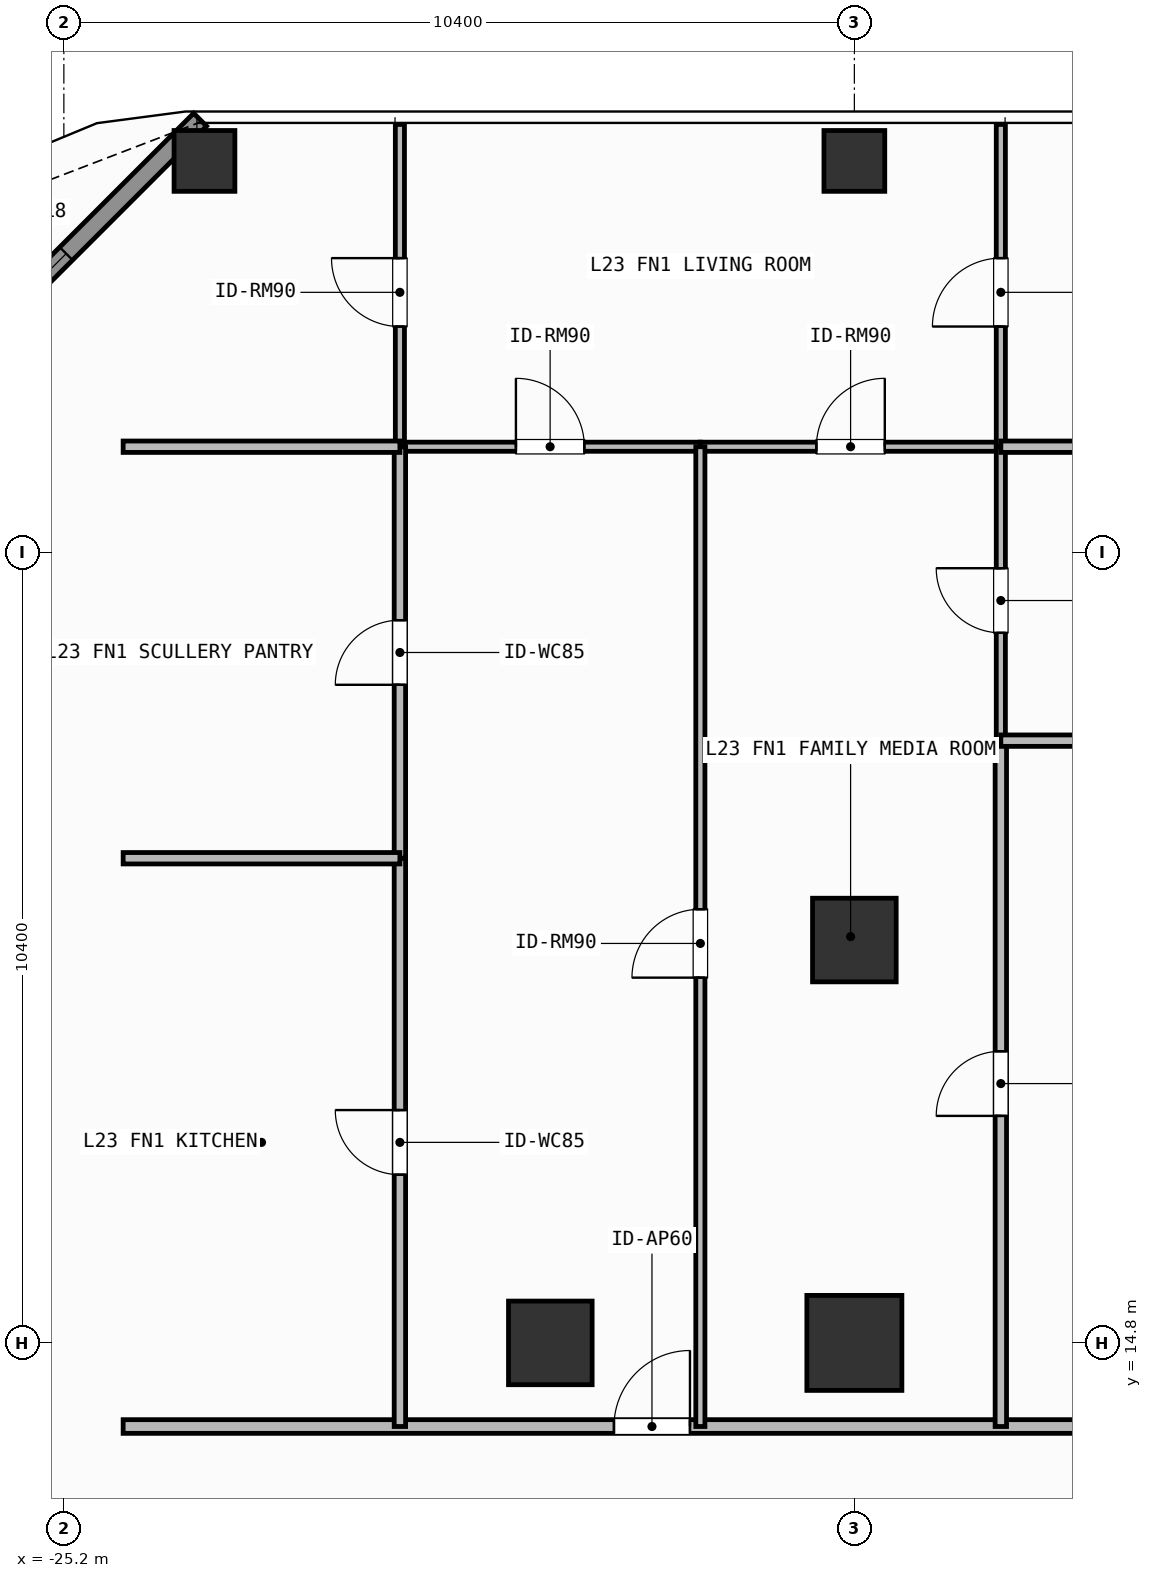
"""IFC4 building model, lengths in metres.
Left out: names, types, materials, properties, quantities, classifications, styles, units other than length and angle.
Written with IfcOpenShell. Run it as: python <this file> out.ifc"""

import sys

from ifc_helpers import new_model, si_unit, direction, frame, frame_2d, origin, origin_2d, place, context, subcontext, project, spatial, rectangle, hollow_rectangle, extrude, element, fill, save


model = new_model("IFC4")
c1 = context("Model", 3, precision=1e-05, world=origin(), true_north=direction((0.0, 1.0)))
c2 = subcontext(c1, "Body", "Model", "MODEL_VIEW")
j1 = project(units=[si_unit("LENGTHUNIT", "METRE"), si_unit("PLANEANGLEUNIT", "RADIAN")], contexts=[c1])
p1 = place(None, origin())
s1 = spatial("IfcSite", under=j1, at=p1, CompositionType="ELEMENT")
p2 = place(p1, origin())
s2 = spatial("IfcBuilding", under=s1, at=p2, CompositionType="ELEMENT")
p3 = place(p2, frame((0.0, 0.0, 93.0)))
s3 = spatial("IfcBuildingStorey", under=s2, at=p3, CompositionType="ELEMENT", Elevation=93.0)
p4 = place(p3, frame((-14.8, 14.8, 0.0), z_axis=(0.0, 0.0, 1.0), x_axis=(1.0, 0.0, 0.0)))
e1 = element("IfcColumn", 1, at=p4, inside=s3, PredefinedType="COLUMN", context=c2, shape_type="SweptSolid", body=[
    extrude(rectangle(XDim=1.25, YDim=1.25, at=origin_2d()), origin(), (0.0, 0.0, 1.0), 3.9),
])
for number, where, z_axis, x_axis in (
    (2, (-18.8, 14.8, 0.0), (0.0, 0.0, 1.0), (1.0, 0.0, 0.0)),
    (3, (-14.8, 20.1, 0.0), (0.0, 0.0, 1.0), (1.0, 0.0, 0.0)),
):
    element("IfcColumn", number, at=place(p3, frame(where, z_axis=z_axis, x_axis=x_axis)), inside=s3, PredefinedType="COLUMN", context=c2, shape_type="SweptSolid", body=[
        extrude(rectangle(XDim=1.1, YDim=1.1, at=origin_2d()), origin(), (0.0, 0.0, 1.0), 3.9),
    ])
for number, where, z_axis, x_axis in (
    (4, (-23.35, 30.35, 0.0), (0.0, 0.0, 1.0), (1.0, 0.0, 0.0)),
    (5, (-14.8, 30.35, 0.0), (0.0, 0.0, 1.0), (1.0, 0.0, 0.0)),
):
    element("IfcColumn", number, at=place(p3, frame(where, z_axis=z_axis, x_axis=x_axis)), inside=s3, PredefinedType="COLUMN", context=c2, shape_type="SweptSolid", body=[
        extrude(hollow_rectangle(XDim=0.8, YDim=0.8, WallThickness=0.036, at=origin_2d()), origin(), (0.0, 0.0, 1.0), 3.9),
    ])
p5 = place(p3, frame((-27.992, 26.308, 0.0), z_axis=(0.0, 0.0, 1.0), x_axis=(0.707106781187, 0.707106781187, 0.0)))
e6 = element("IfcWall", 6, at=p5, inside=s3, PredefinedType="SOLIDWALL", context=c2, shape_type="SweptSolid", body=[
    extrude(rectangle(XDim=6.484, YDim=0.24, at=frame_2d((3.242, 0.0))), origin(), (0.0, 0.0, 1.0), 3.68),
])
p6 = place(p5, frame((2.492, 0.0, 0.8)))
e7 = element("IfcOpeningElement", 7, at=p6, cuts=e6, PredefinedType="OPENING", context=c2, shape_type="SweptSolid", body=[
    extrude(rectangle(XDim=1.5, YDim=1.85, at=frame_2d((0.75, 0.925))), frame((0.0, 0.13, 0.0), z_axis=(0.0, -1.0, 0.0), x_axis=(1.0, 0.0, 0.0)), (0.0, 0.0, 1.0), 0.26),
])
p7 = place(p3, frame((-24.42, 13.7, 0.0), z_axis=(0.0, 0.0, 1.0), x_axis=(1.0, 0.0, 0.0)))
e8 = element("IfcWall", 8, at=p7, inside=s3, PredefinedType="PARTITIONING", context=c2, shape_type="SweptSolid", body=[
    extrude(rectangle(XDim=14.634, YDim=0.18, at=frame_2d((7.317, 0.0))), origin(), (0.0, 0.0, 1.0), 3.68),
])
p8 = place(p7, frame((6.457, 0.0, 0.0)))
e9 = element("IfcOpeningElement", 9, at=p8, cuts=e8, PredefinedType="OPENING", context=c2, shape_type="SweptSolid", body=[
    extrude(rectangle(XDim=1.0, YDim=2.2, at=frame_2d((0.5, 1.1))), frame((0.0, 0.1, 0.0), z_axis=(0.0, -1.0, 0.0), x_axis=(1.0, 0.0, 0.0)), (0.0, 0.0, 1.0), 0.2),
])
p9 = place(p3, frame((-20.779, 26.59, 0.0), z_axis=(0.0, 0.0, 1.0), x_axis=(1.0, 0.0, 0.0)))
e10 = element("IfcWall", 10, at=p9, inside=s3, PredefinedType="PARTITIONING", context=c2, shape_type="SweptSolid", body=[
    extrude(rectangle(XDim=3.953, YDim=0.12, at=frame_2d((1.977, 0.0))), origin(), (0.0, 0.0, 1.0), 3.68),
])
p10 = place(p9, frame((1.527, 0.0, 0.0)))
e11 = element("IfcOpeningElement", 11, at=p10, cuts=e10, PredefinedType="OPENING", context=c2, shape_type="SweptSolid", body=[
    extrude(rectangle(XDim=0.9, YDim=2.1, at=frame_2d((0.45, 1.05))), frame((0.0, 0.07, 0.0), z_axis=(0.0, -1.0, 0.0), x_axis=(1.0, 0.0, 0.0)), (0.0, 0.0, 1.0), 0.14),
])
p11 = place(p3, frame((-16.826, 26.59, 0.0), z_axis=(0.0, 0.0, 1.0), x_axis=(1.0, 0.0, 0.0)))
e12 = element("IfcWall", 12, at=p11, inside=s3, PredefinedType="PARTITIONING", context=c2, shape_type="SweptSolid", body=[
    extrude(rectangle(XDim=3.953, YDim=0.12, at=frame_2d((1.977, 0.0))), origin(), (0.0, 0.0, 1.0), 3.68),
])
p12 = place(p11, frame((1.527, 0.0, 0.0)))
e13 = element("IfcOpeningElement", 13, at=p12, cuts=e12, PredefinedType="OPENING", context=c2, shape_type="SweptSolid", body=[
    extrude(rectangle(XDim=0.9, YDim=2.1, at=frame_2d((0.45, 1.05))), frame((0.0, 0.07, 0.0), z_axis=(0.0, -1.0, 0.0), x_axis=(1.0, 0.0, 0.0)), (0.0, 0.0, 1.0), 0.14),
])
p13 = place(p3, frame((-16.826, 13.7, 0.0), z_axis=(0.0, 0.0, 1.0), x_axis=(0.0, 1.0, 0.0)))
e14 = element("IfcWall", 14, at=p13, inside=s3, PredefinedType="PARTITIONING", context=c2, shape_type="SweptSolid", body=[
    extrude(rectangle(XDim=12.89, YDim=0.12, at=frame_2d((6.445, 0.0))), origin(), (0.0, 0.0, 1.0), 3.68),
])
p14 = place(p13, frame((5.905, 0.0, 0.0)))
e15 = element("IfcOpeningElement", 15, at=p14, cuts=e14, PredefinedType="OPENING", context=c2, shape_type="SweptSolid", body=[
    extrude(rectangle(XDim=0.9, YDim=2.1, at=frame_2d((0.45, 1.05))), frame((0.0, 0.07, 0.0), z_axis=(0.0, -1.0, 0.0), x_axis=(1.0, 0.0, 0.0)), (0.0, 0.0, 1.0), 0.14),
])
p15 = place(p3, frame((-20.779, 13.7, 0.0), z_axis=(0.0, 0.0, 1.0), x_axis=(0.0, 1.0, 0.0)))
e16 = element("IfcWall", 16, at=p15, inside=s3, PredefinedType="PARTITIONING", context=c2, shape_type="SweptSolid", body=[
    extrude(rectangle(XDim=7.476, YDim=0.15, at=frame_2d((3.738, 0.0))), origin(), (0.0, 0.0, 1.0), 3.68),
])
p16 = place(p15, frame((3.313, 0.0, 0.0)))
e17 = element("IfcOpeningElement", 17, at=p16, cuts=e16, PredefinedType="OPENING", context=c2, shape_type="SweptSolid", body=[
    extrude(rectangle(XDim=0.85, YDim=2.1, at=frame_2d((0.425, 1.05))), frame((0.0, 0.085, 0.0), z_axis=(0.0, -1.0, 0.0), x_axis=(1.0, 0.0, 0.0)), (0.0, 0.0, 1.0), 0.17),
])
p17 = place(p3, frame((-20.779, 21.176, 0.0), z_axis=(0.0, 0.0, 1.0), x_axis=(0.0, 1.0, 0.0)))
e18 = element("IfcWall", 18, at=p17, inside=s3, PredefinedType="PARTITIONING", context=c2, shape_type="SweptSolid", body=[
    extrude(rectangle(XDim=5.414, YDim=0.15, at=frame_2d((2.707, 0.0))), origin(), (0.0, 0.0, 1.0), 3.68),
])
p18 = place(p17, frame((2.282, 0.0, 0.0)))
e19 = element("IfcOpeningElement", 19, at=p18, cuts=e18, PredefinedType="OPENING", context=c2, shape_type="SweptSolid", body=[
    extrude(rectangle(XDim=0.85, YDim=2.1, at=frame_2d((0.425, 1.05))), frame((0.0, 0.085, 0.0), z_axis=(0.0, -1.0, 0.0), x_axis=(1.0, 0.0, 0.0)), (0.0, 0.0, 1.0), 0.17),
])
p19 = place(p3, frame((-20.779, 26.59, 0.0), z_axis=(0.0, 0.0, 1.0), x_axis=(0.0, 1.0, 0.0)))
e20 = element("IfcWall", 20, at=p19, inside=s3, PredefinedType="PARTITIONING", context=c2, shape_type="SweptSolid", body=[
    extrude(rectangle(XDim=4.24, YDim=0.12, at=frame_2d((2.12, 0.0))), origin(), (0.0, 0.0, 1.0), 3.68),
])
p20 = place(p19, frame((1.581, 0.0, 0.0)))
e21 = element("IfcOpeningElement", 21, at=p20, cuts=e20, PredefinedType="OPENING", context=c2, shape_type="SweptSolid", body=[
    extrude(rectangle(XDim=0.9, YDim=2.1, at=frame_2d((0.45, 1.05))), frame((0.0, 0.07, 0.0), z_axis=(0.0, -1.0, 0.0), x_axis=(1.0, 0.0, 0.0)), (0.0, 0.0, 1.0), 0.14),
])
p21 = place(p3, frame((-12.873, 13.7, 0.0), z_axis=(0.0, 0.0, 1.0), x_axis=(0.0, 1.0, 0.0)))
e22 = element("IfcWall", 22, at=p21, inside=s3, PredefinedType="PARTITIONING", context=c2, shape_type="SweptSolid", body=[
    extrude(rectangle(XDim=9.023, YDim=0.15, at=frame_2d((4.511, 0.0))), origin(), (0.0, 0.0, 1.0), 3.68),
])
p22 = place(p21, frame((4.086, 0.0, 0.0)))
e23 = element("IfcOpeningElement", 23, at=p22, cuts=e22, PredefinedType="OPENING", context=c2, shape_type="SweptSolid", body=[
    extrude(rectangle(XDim=0.85, YDim=2.1, at=frame_2d((0.425, 1.05))), frame((0.0, 0.085, 0.0), z_axis=(0.0, -1.0, 0.0), x_axis=(1.0, 0.0, 0.0)), (0.0, 0.0, 1.0), 0.17),
])
p23 = place(p3, frame((-12.873, 22.723, 0.0), z_axis=(0.0, 0.0, 1.0), x_axis=(0.0, 1.0, 0.0)))
e24 = element("IfcWall", 24, at=p23, inside=s3, PredefinedType="PARTITIONING", context=c2, shape_type="SweptSolid", body=[
    extrude(rectangle(XDim=3.867, YDim=0.12, at=frame_2d((1.934, 0.0))), origin(), (0.0, 0.0, 1.0), 3.68),
])
p24 = place(p23, frame((1.419, 0.0, 0.0)))
e25 = element("IfcOpeningElement", 25, at=p24, cuts=e24, PredefinedType="OPENING", context=c2, shape_type="SweptSolid", body=[
    extrude(rectangle(XDim=0.85, YDim=2.1, at=frame_2d((0.425, 1.05))), frame((0.0, 0.07, 0.0), z_axis=(0.0, -1.0, 0.0), x_axis=(1.0, 0.0, 0.0)), (0.0, 0.0, 1.0), 0.14),
])
p25 = place(p3, frame((-12.873, 26.59, 0.0), z_axis=(0.0, 0.0, 1.0), x_axis=(0.0, 1.0, 0.0)))
e26 = element("IfcWall", 26, at=p25, inside=s3, PredefinedType="PARTITIONING", context=c2, shape_type="SweptSolid", body=[
    extrude(rectangle(XDim=4.24, YDim=0.12, at=frame_2d((2.12, 0.0))), origin(), (0.0, 0.0, 1.0), 3.68),
])
p26 = place(p25, frame((1.581, 0.0, 0.0)))
e27 = element("IfcOpeningElement", 27, at=p26, cuts=e26, PredefinedType="OPENING", context=c2, shape_type="SweptSolid", body=[
    extrude(rectangle(XDim=0.9, YDim=2.1, at=frame_2d((0.45, 1.05))), frame((0.0, 0.07, 0.0), z_axis=(0.0, -1.0, 0.0), x_axis=(1.0, 0.0, 0.0)), (0.0, 0.0, 1.0), 0.14),
])
for number, where, z_axis, x_axis in (
    (28, (-24.42, 21.176, 0.0), (0.0, 0.0, 1.0), (1.0, 0.0, 0.0)),
    (29, (-24.42, 26.59, 0.0), (0.0, 0.0, 1.0), (1.0, 0.0, 0.0)),
):
    element("IfcWall", number, at=place(p3, frame(where, z_axis=z_axis, x_axis=x_axis)), inside=s3, PredefinedType="PARTITIONING", context=c2, shape_type="SweptSolid", body=[
        extrude(rectangle(XDim=3.641, YDim=0.15, at=frame_2d((1.82, 0.0))), origin(), (0.0, 0.0, 1.0), 3.68),
    ])
for number, where, z_axis, x_axis in (
    (30, (-12.873, 22.723, 0.0), (0.0, 0.0, 1.0), (1.0, 0.0, 0.0)),
    (31, (-12.873, 26.59, 0.0), (0.0, 0.0, 1.0), (1.0, 0.0, 0.0)),
):
    element("IfcWall", number, at=place(p3, frame(where, z_axis=z_axis, x_axis=x_axis)), inside=s3, PredefinedType="PARTITIONING", context=c2, shape_type="SweptSolid", body=[
        extrude(rectangle(XDim=3.087, YDim=0.15, at=frame_2d((1.543, 0.0))), origin(), (0.0, 0.0, 1.0), 3.68),
    ])
p27 = place(p6, origin())
e32 = element("IfcWindow", 32, at=p27, inside=s3, PartitioningType="SINGLE_PANEL", PredefinedType="WINDOW", context=c2, shape_type="SweptSolid", body=[
    extrude(rectangle(XDim=1.5, YDim=1.85, at=frame_2d((0.75, 0.925))), frame((0.0, 0.03, 0.0), z_axis=(0.0, -1.0, 0.0), x_axis=(1.0, 0.0, 0.0)), (0.0, 0.0, 1.0), 0.06),
])
fill(e7, e32)
p28 = place(p8, origin())
e33 = element("IfcDoor", 33, at=p28, inside=s3, OperationType="SINGLE_SWING_RIGHT", PredefinedType="DOOR", context=c2, shape_type="SweptSolid", body=[
    extrude(rectangle(XDim=1.0, YDim=2.2, at=frame_2d((0.5, 1.1))), frame((0.0, 0.025, 0.0), z_axis=(0.0, -1.0, 0.0), x_axis=(1.0, 0.0, 0.0)), (0.0, 0.0, 1.0), 0.05),
])
fill(e9, e33)
p29 = place(p10, origin())
e34 = element("IfcDoor", 34, at=p29, inside=s3, OperationType="SINGLE_SWING_LEFT", PredefinedType="DOOR", context=c2, shape_type="SweptSolid", body=[
    extrude(rectangle(XDim=0.9, YDim=2.1, at=frame_2d((0.45, 1.05))), frame((0.0, 0.025, 0.0), z_axis=(0.0, -1.0, 0.0), x_axis=(1.0, 0.0, 0.0)), (0.0, 0.0, 1.0), 0.05),
])
fill(e11, e34)
p30 = place(p12, origin())
e35 = element("IfcDoor", 35, at=p30, inside=s3, OperationType="SINGLE_SWING_RIGHT", PredefinedType="DOOR", context=c2, shape_type="SweptSolid", body=[
    extrude(rectangle(XDim=0.9, YDim=2.1, at=frame_2d((0.45, 1.05))), frame((0.0, 0.025, 0.0), z_axis=(0.0, -1.0, 0.0), x_axis=(1.0, 0.0, 0.0)), (0.0, 0.0, 1.0), 0.05),
])
fill(e13, e35)
p31 = place(p14, origin())
e36 = element("IfcDoor", 36, at=p31, inside=s3, OperationType="SINGLE_SWING_LEFT", PredefinedType="DOOR", context=c2, shape_type="SweptSolid", body=[
    extrude(rectangle(XDim=0.9, YDim=2.1, at=frame_2d((0.45, 1.05))), frame((0.0, 0.025, 0.0), z_axis=(0.0, -1.0, 0.0), x_axis=(1.0, 0.0, 0.0)), (0.0, 0.0, 1.0), 0.05),
])
fill(e15, e36)
p32 = place(p16, origin())
e37 = element("IfcDoor", 37, at=p32, inside=s3, OperationType="SINGLE_SWING_RIGHT", PredefinedType="DOOR", context=c2, shape_type="SweptSolid", body=[
    extrude(rectangle(XDim=0.85, YDim=2.1, at=frame_2d((0.425, 1.05))), frame((0.0, 0.025, 0.0), z_axis=(0.0, -1.0, 0.0), x_axis=(1.0, 0.0, 0.0)), (0.0, 0.0, 1.0), 0.05),
])
fill(e17, e37)
p33 = place(p18, origin())
e38 = element("IfcDoor", 38, at=p33, inside=s3, OperationType="SINGLE_SWING_LEFT", PredefinedType="DOOR", context=c2, shape_type="SweptSolid", body=[
    extrude(rectangle(XDim=0.85, YDim=2.1, at=frame_2d((0.425, 1.05))), frame((0.0, 0.025, 0.0), z_axis=(0.0, -1.0, 0.0), x_axis=(1.0, 0.0, 0.0)), (0.0, 0.0, 1.0), 0.05),
])
fill(e19, e38)
p34 = place(p20, origin())
e39 = element("IfcDoor", 39, at=p34, inside=s3, OperationType="SINGLE_SWING_RIGHT", PredefinedType="DOOR", context=c2, shape_type="SweptSolid", body=[
    extrude(rectangle(XDim=0.9, YDim=2.1, at=frame_2d((0.45, 1.05))), frame((0.0, 0.025, 0.0), z_axis=(0.0, -1.0, 0.0), x_axis=(1.0, 0.0, 0.0)), (0.0, 0.0, 1.0), 0.05),
])
fill(e21, e39)
p35 = place(p22, origin())
e40 = element("IfcDoor", 40, at=p35, inside=s3, OperationType="SINGLE_SWING_LEFT", PredefinedType="DOOR", context=c2, shape_type="SweptSolid", body=[
    extrude(rectangle(XDim=0.85, YDim=2.1, at=frame_2d((0.425, 1.05))), frame((0.0, 0.025, 0.0), z_axis=(0.0, -1.0, 0.0), x_axis=(1.0, 0.0, 0.0)), (0.0, 0.0, 1.0), 0.05),
])
fill(e23, e40)
p36 = place(p24, origin())
e41 = element("IfcDoor", 41, at=p36, inside=s3, OperationType="SINGLE_SWING_RIGHT", PredefinedType="DOOR", context=c2, shape_type="SweptSolid", body=[
    extrude(rectangle(XDim=0.85, YDim=2.1, at=frame_2d((0.425, 1.05))), frame((0.0, 0.025, 0.0), z_axis=(0.0, -1.0, 0.0), x_axis=(1.0, 0.0, 0.0)), (0.0, 0.0, 1.0), 0.05),
])
fill(e25, e41)
p37 = place(p26, origin())
e42 = element("IfcDoor", 42, at=p37, inside=s3, OperationType="SINGLE_SWING_LEFT", PredefinedType="DOOR", context=c2, shape_type="SweptSolid", body=[
    extrude(rectangle(XDim=0.9, YDim=2.1, at=frame_2d((0.45, 1.05))), frame((0.0, 0.025, 0.0), z_axis=(0.0, -1.0, 0.0), x_axis=(1.0, 0.0, 0.0)), (0.0, 0.0, 1.0), 0.05),
])
fill(e27, e42)
save(model, sys.argv[1])
